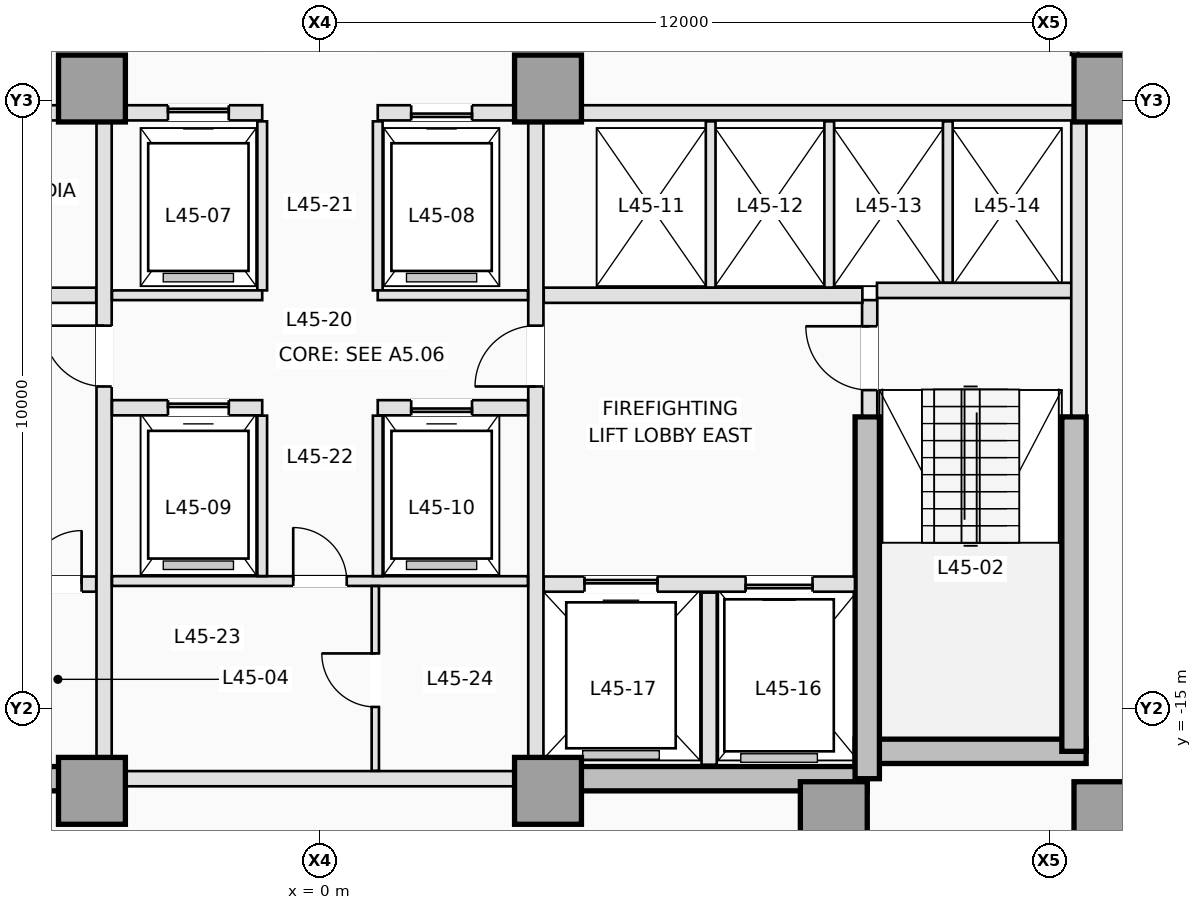
"""IFC4 building model, lengths in metres.
Left out: names, types, materials, properties, quantities, classifications, styles, units other than length and angle.
Written with IfcOpenShell. Run it as: python <this file> out.ifc"""

import sys

from ifc_helpers import new_model, si_unit, direction, frame, frame_2d, origin, origin_2d, place, context, subcontext, project, spatial, rectangle, extrude, element, fill, save


model = new_model("IFC4")
c1 = context("Model", 3, precision=1e-05, world=origin(), true_north=direction((0.0, 1.0)))
c2 = subcontext(c1, "Body", "Model", "MODEL_VIEW")
j1 = project(units=[si_unit("LENGTHUNIT", "METRE"), si_unit("PLANEANGLEUNIT", "RADIAN")], contexts=[c1])
p1 = place(None, origin())
s1 = spatial("IfcSite", under=j1, at=p1, CompositionType="ELEMENT")
p2 = place(p1, origin())
s2 = spatial("IfcBuilding", under=s1, at=p2, CompositionType="ELEMENT")
p3 = place(p2, frame((0.0, 0.0, 165.0)))
s3 = spatial("IfcBuildingStorey", under=s2, at=p3, CompositionType="ELEMENT", Elevation=165.0)
for number, where, z_axis, x_axis in (
    (1, (-9.0, -16.15, 0.0), (0.0, 0.0, 1.0), (1.0, 0.0, 0.0)),
    (2, (3.75, -16.15, 0.0), (0.0, 0.0, 1.0), (1.0, 0.0, 0.0)),
):
    element("IfcWall", number, at=place(p3, frame(where, z_axis=z_axis, x_axis=x_axis)), inside=s3, PredefinedType="SHEAR", context=c2, shape_type="SweptSolid", body=[
        extrude(rectangle(XDim=5.25, YDim=0.4, at=frame_2d((2.625, 0.0))), origin(), (0.0, 0.0, 1.0), 3.5),
    ])
p4 = place(p3, frame((8.8, -15.7, 0.0), z_axis=(0.0, 0.0, 1.0), x_axis=(1.0, 0.0, 0.0)))
e3 = element("IfcWall", 3, at=p4, inside=s3, PredefinedType="SHEAR", context=c2, shape_type="SweptSolid", body=[
    extrude(rectangle(XDim=3.8, YDim=0.4, at=frame_2d((1.9, 0.0))), origin(), (0.0, 0.0, 1.0), 3.5),
])
p5 = place(p3, frame((12.4, -15.7, 0.0), z_axis=(0.0, 0.0, 1.0), x_axis=(0.0, 1.0, 0.0)))
e4 = element("IfcWall", 4, at=p5, inside=s3, PredefinedType="SHEAR", context=c2, shape_type="SweptSolid", body=[
    extrude(rectangle(XDim=5.5, YDim=0.4, at=frame_2d((2.75, 0.0))), origin(), (0.0, 0.0, 1.0), 3.5),
])
p6 = place(p3, frame((9.0, -16.15, 0.0), z_axis=(0.0, 0.0, 1.0), x_axis=(0.0, 1.0, 0.0)))
e5 = element("IfcWall", 5, at=p6, inside=s3, PredefinedType="SHEAR", context=c2, shape_type="SweptSolid", body=[
    extrude(rectangle(XDim=5.95, YDim=0.4, at=frame_2d((2.975, 0.0))), origin(), (0.0, 0.0, 1.0), 3.5),
])
for number, where, z_axis, x_axis in (
    (6, (-3.75, -16.35, 0.0), (0.0, 0.0, 1.0), (1.0, 0.0, 0.0)),
    (7, (3.75, -16.35, 0.0), (0.0, 0.0, 1.0), (1.0, 0.0, 0.0)),
    (8, (8.45, -16.75, 0.0), (0.0, 0.0, 1.0), (1.0, 0.0, 0.0)),
    (9, (12.95, -16.75, 0.0), (0.0, 0.0, 1.0), (1.0, 0.0, 0.0)),
    (10, (-3.75, -4.8, 0.0), (0.0, 0.0, 1.0), (1.0, 0.0, 0.0)),
    (11, (3.75, -4.8, 0.0), (0.0, 0.0, 1.0), (1.0, 0.0, 0.0)),
    (12, (12.95, -4.8, 0.0), (0.0, 0.0, 1.0), (1.0, 0.0, 0.0)),
):
    element("IfcColumn", number, at=place(p3, frame(where, z_axis=z_axis, x_axis=x_axis)), inside=s3, PredefinedType="COLUMN", context=c2, shape_type="SweptSolid", body=[
        extrude(rectangle(XDim=1.1, YDim=1.1, at=origin_2d()), origin(), (0.0, 0.0, 1.0), 3.5),
    ])
p7 = place(p3, frame((9.04, -10.18, 0.0), z_axis=(0.0, 0.0, 1.0), x_axis=(0.0, 1.0, 0.0)))
e13 = element("IfcWall", 13, at=p7, inside=s3, PredefinedType="PARTITIONING", context=c2, shape_type="SweptSolid", body=[
    extrude(rectangle(XDim=1.9, YDim=0.25, at=frame_2d((0.95, 0.0))), origin(), (0.0, 0.0, 1.0), 3.25),
])
p8 = place(p7, frame((0.42, 0.0, 0.0)))
e14 = element("IfcOpeningElement", 14, at=p8, cuts=e13, PredefinedType="OPENING", context=c2, shape_type="SweptSolid", body=[
    extrude(rectangle(XDim=1.05, YDim=2.15, at=frame_2d((0.525, 1.075))), frame((0.0, 0.135, 0.0), z_axis=(0.0, -1.0, 0.0), x_axis=(1.0, 0.0, 0.0)), (0.0, 0.0, 1.0), 0.27),
])
p9 = place(p3, frame((9.16, -8.12, 0.0), z_axis=(0.0, 0.0, 1.0), x_axis=(1.0, 0.0, 0.0)))
e15 = element("IfcWall", 15, at=p9, inside=s3, PredefinedType="PARTITIONING", context=c2, shape_type="SweptSolid", body=[
    extrude(rectangle(XDim=3.22, YDim=0.25, at=frame_2d((1.61, 0.0))), origin(), (0.0, 0.0, 1.0), 3.25),
])
p10 = place(p3, frame((12.48, -10.18, 0.0), z_axis=(0.0, 0.0, 1.0), x_axis=(0.0, 1.0, 0.0)))
e16 = element("IfcWall", 16, at=p10, inside=s3, PredefinedType="PARTITIONING", context=c2, shape_type="SweptSolid", body=[
    extrude(rectangle(XDim=4.828, YDim=0.25, at=frame_2d((2.414, 0.0))), origin(), (0.0, 0.0, 1.0), 3.25),
])
p11 = place(p3, frame((-8.798, -12.95, 0.0), z_axis=(0.0, 0.0, 1.0), x_axis=(1.0, 0.0, 0.0)))
e17 = element("IfcWall", 17, at=p11, inside=s3, PredefinedType="PARTITIONING", context=c2, shape_type="SweptSolid", body=[
    extrude(rectangle(XDim=5.118, YDim=0.25, at=frame_2d((2.559, 0.0))), origin(), (0.0, 0.0, 1.0), 3.25),
])
p12 = place(p11, frame((0.698, 0.0, 0.0)))
e18 = element("IfcOpeningElement", 18, at=p12, cuts=e17, PredefinedType="OPENING", context=c2, shape_type="SweptSolid", body=[
    extrude(rectangle(XDim=1.1, YDim=2.15, at=frame_2d((0.55, 1.075))), frame((0.0, 0.135, 0.0), z_axis=(0.0, -1.0, 0.0), x_axis=(1.0, 0.0, 0.0)), (0.0, 0.0, 1.0), 0.27),
])
p13 = place(p11, frame((2.598, 0.0, 0.0)))
e19 = element("IfcOpeningElement", 19, at=p13, cuts=e17, PredefinedType="OPENING", context=c2, shape_type="SweptSolid", body=[
    extrude(rectangle(XDim=0.88, YDim=2.1, at=frame_2d((0.44, 1.05))), frame((0.0, 0.135, 0.0), z_axis=(0.0, -1.0, 0.0), x_axis=(1.0, 0.0, 0.0)), (0.0, 0.0, 1.0), 0.27),
])
p14 = place(p11, frame((3.998, 0.0, 0.0)))
e20 = element("IfcOpeningElement", 20, at=p14, cuts=e17, PredefinedType="OPENING", context=c2, shape_type="SweptSolid", body=[
    extrude(rectangle(XDim=0.88, YDim=2.1, at=frame_2d((0.44, 1.05))), frame((0.0, 0.135, 0.0), z_axis=(0.0, -1.0, 0.0), x_axis=(1.0, 0.0, 0.0)), (0.0, 0.0, 1.0), 0.27),
])
p15 = place(p3, frame((3.68, -12.95, 0.0), z_axis=(0.0, 0.0, 1.0), x_axis=(1.0, 0.0, 0.0)))
e21 = element("IfcWall", 21, at=p15, inside=s3, PredefinedType="PARTITIONING", context=c2, shape_type="SweptSolid", body=[
    extrude(rectangle(XDim=5.118, YDim=0.25, at=frame_2d((2.559, 0.0))), origin(), (0.0, 0.0, 1.0), 3.25),
])
p16 = place(p15, frame((3.32, 0.0, 0.0)))
e22 = element("IfcOpeningElement", 22, at=p16, cuts=e21, PredefinedType="OPENING", context=c2, shape_type="SweptSolid", body=[
    extrude(rectangle(XDim=1.1, YDim=2.15, at=frame_2d((0.55, 1.075))), frame((0.0, 0.135, 0.0), z_axis=(0.0, -1.0, 0.0), x_axis=(1.0, 0.0, 0.0)), (0.0, 0.0, 1.0), 0.27),
])
p17 = place(p15, frame((0.67, 0.0, 0.0)))
e23 = element("IfcOpeningElement", 23, at=p17, cuts=e21, PredefinedType="OPENING", context=c2, shape_type="SweptSolid", body=[
    extrude(rectangle(XDim=1.2, YDim=2.15, at=frame_2d((0.6, 1.075))), frame((0.0, 0.135, 0.0), z_axis=(0.0, -1.0, 0.0), x_axis=(1.0, 0.0, 0.0)), (0.0, 0.0, 1.0), 0.27),
])
p18 = place(p3, frame((6.4, -15.92, 0.0), z_axis=(0.0, 0.0, 1.0), x_axis=(0.0, 1.0, 0.0)))
e24 = element("IfcWall", 24, at=p18, inside=s3, PredefinedType="PARTITIONING", context=c2, shape_type="SweptSolid", body=[
    extrude(rectangle(XDim=2.83, YDim=0.25, at=frame_2d((1.415, 0.0))), origin(), (0.0, 0.0, 1.0), 3.25),
])
for number, where, z_axis, x_axis in (
    (25, (-8.92, -8.2, 0.0), (0.0, 0.0, 1.0), (1.0, 0.0, 0.0)),
    (26, (3.68, -8.2, 0.0), (0.0, 0.0, 1.0), (1.0, 0.0, 0.0)),
):
    element("IfcWall", number, at=place(p3, frame(where, z_axis=z_axis, x_axis=x_axis)), inside=s3, PredefinedType="PARTITIONING", context=c2, shape_type="SweptSolid", body=[
        extrude(rectangle(XDim=5.24, YDim=0.25, at=frame_2d((2.62, 0.0))), origin(), (0.0, 0.0, 1.0), 3.25),
    ])
p19 = place(p3, frame((-3.55, -15.798, 0.0), z_axis=(0.0, 0.0, 1.0), x_axis=(0.0, 1.0, 0.0)))
e27 = element("IfcWall", 27, at=p19, inside=s3, PredefinedType="PARTITIONING", context=c2, shape_type="SweptSolid", body=[
    extrude(rectangle(XDim=10.446, YDim=0.25, at=frame_2d((5.223, 0.0))), origin(), (0.0, 0.0, 1.0), 3.25),
])
p20 = place(p19, frame((6.098, 0.0, 0.0)))
e28 = element("IfcOpeningElement", 28, at=p20, cuts=e27, PredefinedType="OPENING", context=c2, shape_type="SweptSolid", body=[
    extrude(rectangle(XDim=1.0, YDim=2.15, at=frame_2d((0.5, 1.075))), frame((0.0, 0.135, 0.0), z_axis=(0.0, -1.0, 0.0), x_axis=(1.0, 0.0, 0.0)), (0.0, 0.0, 1.0), 0.27),
])
p21 = place(p3, frame((3.55, -15.798, 0.0), z_axis=(0.0, 0.0, 1.0), x_axis=(0.0, 1.0, 0.0)))
e29 = element("IfcWall", 29, at=p21, inside=s3, PredefinedType="PARTITIONING", context=c2, shape_type="SweptSolid", body=[
    extrude(rectangle(XDim=10.446, YDim=0.25, at=frame_2d((5.223, 0.0))), origin(), (0.0, 0.0, 1.0), 3.25),
])
p22 = place(p21, frame((6.098, 0.0, 0.0)))
e30 = element("IfcOpeningElement", 30, at=p22, cuts=e29, PredefinedType="OPENING", context=c2, shape_type="SweptSolid", body=[
    extrude(rectangle(XDim=1.0, YDim=2.15, at=frame_2d((0.5, 1.075))), frame((0.0, 0.135, 0.0), z_axis=(0.0, -1.0, 0.0), x_axis=(1.0, 0.0, 0.0)), (0.0, 0.0, 1.0), 0.27),
])
p23 = place(p3, frame((-12.398, -5.2, 0.0), z_axis=(0.0, 0.0, 1.0), x_axis=(1.0, 0.0, 0.0)))
e31 = element("IfcWall", 31, at=p23, inside=s3, PredefinedType="PARTITIONING", context=c2, shape_type="SweptSolid", body=[
    extrude(rectangle(XDim=8.096, YDim=0.25, at=frame_2d((4.048, 0.0))), origin(), (0.0, 0.0, 1.0), 3.25),
])
p24 = place(p23, frame((2.968, 0.0, 0.0)))
e32 = element("IfcOpeningElement", 32, at=p24, cuts=e31, PredefinedType="OPENING", context=c2, shape_type="SweptSolid", body=[
    extrude(rectangle(XDim=0.92, YDim=2.12, at=frame_2d((0.46, 1.06))), frame((0.0, 0.135, 0.0), z_axis=(0.0, -1.0, 0.0), x_axis=(1.0, 0.0, 0.0)), (0.0, 0.0, 1.0), 0.27),
])
p25 = place(p23, frame((6.068, 0.0, 0.0)))
e33 = element("IfcOpeningElement", 33, at=p25, cuts=e31, PredefinedType="OPENING", context=c2, shape_type="SweptSolid", body=[
    extrude(rectangle(XDim=0.92, YDim=2.12, at=frame_2d((0.46, 1.06))), frame((0.0, 0.135, 0.0), z_axis=(0.0, -1.0, 0.0), x_axis=(1.0, 0.0, 0.0)), (0.0, 0.0, 1.0), 0.27),
])
p26 = place(p3, frame((4.302, -5.2, 0.0), z_axis=(0.0, 0.0, 1.0), x_axis=(1.0, 0.0, 0.0)))
e34 = element("IfcWall", 34, at=p26, inside=s3, PredefinedType="PARTITIONING", context=c2, shape_type="SweptSolid", body=[
    extrude(rectangle(XDim=8.096, YDim=0.25, at=frame_2d((4.048, 0.0))), origin(), (0.0, 0.0, 1.0), 3.25),
])
p27 = place(p3, frame((-3.198, -5.2, 0.0), z_axis=(0.0, 0.0, 1.0), x_axis=(1.0, 0.0, 0.0)))
e35 = element("IfcWall", 35, at=p27, inside=s3, PredefinedType="PARTITIONING", context=c2, shape_type="SweptSolid", body=[
    extrude(rectangle(XDim=2.248, YDim=0.25, at=frame_2d((1.124, 0.0))), origin(), (0.0, 0.0, 1.0), 3.25),
])
p28 = place(p27, frame((0.698, 0.0, 0.0)))
e36 = element("IfcOpeningElement", 36, at=p28, cuts=e35, PredefinedType="OPENING", context=c2, shape_type="SweptSolid", body=[
    extrude(rectangle(XDim=1.0, YDim=2.15, at=frame_2d((0.5, 1.075))), frame((0.0, 0.135, 0.0), z_axis=(0.0, -1.0, 0.0), x_axis=(1.0, 0.0, 0.0)), (0.0, 0.0, 1.0), 0.27),
])
p29 = place(p3, frame((0.95, -5.2, 0.0), z_axis=(0.0, 0.0, 1.0), x_axis=(1.0, 0.0, 0.0)))
e37 = element("IfcWall", 37, at=p29, inside=s3, PredefinedType="PARTITIONING", context=c2, shape_type="SweptSolid", body=[
    extrude(rectangle(XDim=2.248, YDim=0.25, at=frame_2d((1.124, 0.0))), origin(), (0.0, 0.0, 1.0), 3.25),
])
p30 = place(p29, frame((0.55, 0.0, 0.0)))
e38 = element("IfcOpeningElement", 38, at=p30, cuts=e37, PredefinedType="OPENING", context=c2, shape_type="SweptSolid", body=[
    extrude(rectangle(XDim=1.0, YDim=2.15, at=frame_2d((0.5, 1.075))), frame((0.0, 0.135, 0.0), z_axis=(0.0, -1.0, 0.0), x_axis=(1.0, 0.0, 0.0)), (0.0, 0.0, 1.0), 0.27),
])
for number, where, z_axis, x_axis in (
    (39, (6.425, -8.073, 0.0), (0.0, 0.0, 1.0), (0.0, 1.0, 0.0)),
    (40, (8.375, -8.073, 0.0), (0.0, 0.0, 1.0), (0.0, 1.0, 0.0)),
):
    element("IfcWall", number, at=place(p3, frame(where, z_axis=z_axis, x_axis=x_axis)), inside=s3, PredefinedType="PARTITIONING", context=c2, shape_type="SweptSolid", body=[
        extrude(rectangle(XDim=2.733, YDim=0.16, at=frame_2d((1.366, 0.0))), origin(), (0.0, 0.0, 1.0), 3.25),
    ])
p31 = place(p3, frame((10.325, -7.993, 0.0), z_axis=(0.0, 0.0, 1.0), x_axis=(0.0, 1.0, 0.0)))
e41 = element("IfcWall", 41, at=p31, inside=s3, PredefinedType="PARTITIONING", context=c2, shape_type="SweptSolid", body=[
    extrude(rectangle(XDim=2.653, YDim=0.16, at=frame_2d((1.326, 0.0))), origin(), (0.0, 0.0, 1.0), 3.25),
])
p32 = place(p3, frame((-3.198, -16.15, 0.0), z_axis=(0.0, 0.0, 1.0), x_axis=(1.0, 0.0, 0.0)))
e42 = element("IfcWall", 42, at=p32, inside=s3, PredefinedType="PARTITIONING", context=c2, shape_type="SweptSolid", body=[
    extrude(rectangle(XDim=6.396, YDim=0.25, at=frame_2d((3.198, 0.0))), origin(), (0.0, 0.0, 1.0), 2.45),
])
for number, where, z_axis, x_axis in (
    (43, (-0.95, -8.12, 0.0), (0.0, 0.0, 1.0), (0.0, 1.0, 0.0)),
    (44, (0.95, -8.12, 0.0), (0.0, 0.0, 1.0), (0.0, 1.0, 0.0)),
):
    element("IfcWall", number, at=place(p3, frame(where, z_axis=z_axis, x_axis=x_axis)), inside=s3, PredefinedType="PARTITIONING", context=c2, shape_type="SweptSolid", body=[
        extrude(rectangle(XDim=2.78, YDim=0.16, at=frame_2d((1.39, 0.0))), origin(), (0.0, 0.0, 1.0), 3.25),
    ])
for number, where, z_axis, x_axis in (
    (45, (-3.42, -8.2, 0.0), (0.0, 0.0, 1.0), (1.0, 0.0, 0.0)),
    (46, (0.95, -8.2, 0.0), (0.0, 0.0, 1.0), (1.0, 0.0, 0.0)),
):
    element("IfcWall", number, at=place(p3, frame(where, z_axis=z_axis, x_axis=x_axis)), inside=s3, PredefinedType="PARTITIONING", context=c2, shape_type="SweptSolid", body=[
        extrude(rectangle(XDim=2.47, YDim=0.16, at=frame_2d((1.235, 0.0))), origin(), (0.0, 0.0, 1.0), 3.25),
    ])
p33 = place(p3, frame((-3.42, -10.05, 0.0), z_axis=(0.0, 0.0, 1.0), x_axis=(1.0, 0.0, 0.0)))
e47 = element("IfcWall", 47, at=p33, inside=s3, PredefinedType="PARTITIONING", context=c2, shape_type="SweptSolid", body=[
    extrude(rectangle(XDim=2.47, YDim=0.25, at=frame_2d((1.235, 0.0))), origin(), (0.0, 0.0, 1.0), 3.25),
])
p34 = place(p33, frame((0.92, 0.0, 0.0)))
e48 = element("IfcOpeningElement", 48, at=p34, cuts=e47, PredefinedType="OPENING", context=c2, shape_type="SweptSolid", body=[
    extrude(rectangle(XDim=1.0, YDim=2.15, at=frame_2d((0.5, 1.075))), frame((0.0, 0.135, 0.0), z_axis=(0.0, -1.0, 0.0), x_axis=(1.0, 0.0, 0.0)), (0.0, 0.0, 1.0), 0.27),
])
p35 = place(p3, frame((0.95, -10.05, 0.0), z_axis=(0.0, 0.0, 1.0), x_axis=(1.0, 0.0, 0.0)))
e49 = element("IfcWall", 49, at=p35, inside=s3, PredefinedType="PARTITIONING", context=c2, shape_type="SweptSolid", body=[
    extrude(rectangle(XDim=2.47, YDim=0.25, at=frame_2d((1.235, 0.0))), origin(), (0.0, 0.0, 1.0), 3.25),
])
p36 = place(p35, frame((0.55, 0.0, 0.0)))
e50 = element("IfcOpeningElement", 50, at=p36, cuts=e49, PredefinedType="OPENING", context=c2, shape_type="SweptSolid", body=[
    extrude(rectangle(XDim=1.0, YDim=2.15, at=frame_2d((0.5, 1.075))), frame((0.0, 0.135, 0.0), z_axis=(0.0, -1.0, 0.0), x_axis=(1.0, 0.0, 0.0)), (0.0, 0.0, 1.0), 0.27),
])
p37 = place(p3, frame((-3.42, -12.9, 0.0), z_axis=(0.0, 0.0, 1.0), x_axis=(1.0, 0.0, 0.0)))
e51 = element("IfcWall", 51, at=p37, inside=s3, PredefinedType="PARTITIONING", context=c2, shape_type="SweptSolid", body=[
    extrude(rectangle(XDim=6.84, YDim=0.16, at=frame_2d((3.42, 0.0))), origin(), (0.0, 0.0, 1.0), 3.25),
])
p38 = place(p37, frame((2.98, 0.0, 0.0)))
e52 = element("IfcOpeningElement", 52, at=p38, cuts=e51, PredefinedType="OPENING", context=c2, shape_type="SweptSolid", body=[
    extrude(rectangle(XDim=0.88, YDim=2.12, at=frame_2d((0.44, 1.06))), frame((0.0, 0.09, 0.0), z_axis=(0.0, -1.0, 0.0), x_axis=(1.0, 0.0, 0.0)), (0.0, 0.0, 1.0), 0.18),
])
for number, where, z_axis, x_axis in (
    (53, (-0.95, -12.818, 0.0), (0.0, 0.0, 1.0), (0.0, 1.0, 0.0)),
    (54, (0.95, -12.818, 0.0), (0.0, 0.0, 1.0), (0.0, 1.0, 0.0)),
):
    element("IfcWall", number, at=place(p3, frame(where, z_axis=z_axis, x_axis=x_axis)), inside=s3, PredefinedType="PARTITIONING", context=c2, shape_type="SweptSolid", body=[
        extrude(rectangle(XDim=2.638, YDim=0.16, at=frame_2d((1.319, 0.0))), origin(), (0.0, 0.0, 1.0), 3.25),
    ])
p39 = place(p3, frame((0.91, -16.02, 0.0), z_axis=(0.0, 0.0, 1.0), x_axis=(0.0, 1.0, 0.0)))
e55 = element("IfcWall", 55, at=p39, inside=s3, PredefinedType="PARTITIONING", context=c2, shape_type="SweptSolid", body=[
    extrude(rectangle(XDim=3.038, YDim=0.12, at=frame_2d((1.519, 0.0))), origin(), (0.0, 0.0, 1.0), 3.25),
])
p40 = place(p39, frame((1.05, 0.0, 0.0)))
e56 = element("IfcOpeningElement", 56, at=p40, cuts=e55, PredefinedType="OPENING", context=c2, shape_type="SweptSolid", body=[
    extrude(rectangle(XDim=0.88, YDim=2.12, at=frame_2d((0.44, 1.06))), frame((0.0, 0.07, 0.0), z_axis=(0.0, -1.0, 0.0), x_axis=(1.0, 0.0, 0.0)), (0.0, 0.0, 1.0), 0.14),
])
p41 = place(p3, frame((12.41, -2.462, 0.0), z_axis=(0.0, 0.0, 1.0), x_axis=(0.0, -1.0, 0.0)))
e57 = element("IfcWall", 57, at=p41, inside=s3, PredefinedType="PARTITIONING", context=c2, shape_type="SweptSolid", body=[
    extrude(rectangle(XDim=1.786, YDim=0.12, at=frame_2d((0.893, 0.0))), origin(), (0.0, 0.0, 1.0), 3.25),
])
p42 = place(p28, origin())
e58 = element("IfcDoor", 58, at=p42, inside=s3, OperationType="SLIDING_TO_LEFT", PredefinedType="DOOR", context=c2, shape_type="SweptSolid", body=[
    extrude(rectangle(XDim=1.0, YDim=2.15, at=frame_2d((0.5, 1.075))), frame((0.0, 0.025, 0.0), z_axis=(0.0, -1.0, 0.0), x_axis=(1.0, 0.0, 0.0)), (0.0, 0.0, 1.0), 0.05),
])
fill(e36, e58)
p43 = place(p30, origin())
e59 = element("IfcDoor", 59, at=p43, inside=s3, OperationType="SLIDING_TO_RIGHT", PredefinedType="DOOR", context=c2, shape_type="SweptSolid", body=[
    extrude(rectangle(XDim=1.0, YDim=2.15, at=frame_2d((0.5, 1.075))), frame((0.0, 0.025, 0.0), z_axis=(0.0, -1.0, 0.0), x_axis=(1.0, 0.0, 0.0)), (0.0, 0.0, 1.0), 0.05),
])
fill(e38, e59)
p44 = place(p16, origin())
e60 = element("IfcDoor", 60, at=p44, inside=s3, OperationType="SLIDING_TO_RIGHT", PredefinedType="DOOR", context=c2, shape_type="SweptSolid", body=[
    extrude(rectangle(XDim=1.1, YDim=2.15, at=frame_2d((0.55, 1.075))), frame((0.0, 0.025, 0.0), z_axis=(0.0, -1.0, 0.0), x_axis=(1.0, 0.0, 0.0)), (0.0, 0.0, 1.0), 0.05),
])
fill(e22, e60)
p45 = place(p17, origin())
e61 = element("IfcDoor", 61, at=p45, inside=s3, OperationType="SLIDING_TO_LEFT", PredefinedType="DOOR", context=c2, shape_type="SweptSolid", body=[
    extrude(rectangle(XDim=1.2, YDim=2.15, at=frame_2d((0.6, 1.075))), frame((0.0, 0.025, 0.0), z_axis=(0.0, -1.0, 0.0), x_axis=(1.0, 0.0, 0.0)), (0.0, 0.0, 1.0), 0.05),
])
fill(e23, e61)
p46 = place(p34, origin())
e62 = element("IfcDoor", 62, at=p46, inside=s3, OperationType="SLIDING_TO_LEFT", PredefinedType="DOOR", context=c2, shape_type="SweptSolid", body=[
    extrude(rectangle(XDim=1.0, YDim=2.15, at=frame_2d((0.5, 1.075))), frame((0.0, 0.025, 0.0), z_axis=(0.0, -1.0, 0.0), x_axis=(1.0, 0.0, 0.0)), (0.0, 0.0, 1.0), 0.05),
])
fill(e48, e62)
p47 = place(p36, origin())
e63 = element("IfcDoor", 63, at=p47, inside=s3, OperationType="SLIDING_TO_RIGHT", PredefinedType="DOOR", context=c2, shape_type="SweptSolid", body=[
    extrude(rectangle(XDim=1.0, YDim=2.15, at=frame_2d((0.5, 1.075))), frame((0.0, 0.025, 0.0), z_axis=(0.0, -1.0, 0.0), x_axis=(1.0, 0.0, 0.0)), (0.0, 0.0, 1.0), 0.05),
])
fill(e50, e63)
p48 = place(p8, origin())
e64 = element("IfcDoor", 64, at=p48, inside=s3, OperationType="SINGLE_SWING_RIGHT", PredefinedType="DOOR", context=c2, shape_type="SweptSolid", body=[
    extrude(rectangle(XDim=1.05, YDim=2.15, at=frame_2d((0.525, 1.075))), frame((0.0, 0.025, 0.0), z_axis=(0.0, -1.0, 0.0), x_axis=(1.0, 0.0, 0.0)), (0.0, 0.0, 1.0), 0.05),
])
fill(e14, e64)
p49 = place(p14, origin())
e65 = element("IfcDoor", 65, at=p49, inside=s3, OperationType="SINGLE_SWING_RIGHT", PredefinedType="TRAPDOOR", context=c2, shape_type="SweptSolid", body=[
    extrude(rectangle(XDim=0.88, YDim=2.1, at=frame_2d((0.44, 1.05))), frame((0.0, 0.025, 0.0), z_axis=(0.0, -1.0, 0.0), x_axis=(1.0, 0.0, 0.0)), (0.0, 0.0, 1.0), 0.05),
])
fill(e20, e65)
p50 = place(p20, origin())
e66 = element("IfcDoor", 66, at=p50, inside=s3, OperationType="SINGLE_SWING_RIGHT", PredefinedType="DOOR", context=c2, shape_type="SweptSolid", body=[
    extrude(rectangle(XDim=1.0, YDim=2.15, at=frame_2d((0.5, 1.075))), frame((0.0, 0.025, 0.0), z_axis=(0.0, -1.0, 0.0), x_axis=(1.0, 0.0, 0.0)), (0.0, 0.0, 1.0), 0.05),
])
fill(e28, e66)
p51 = place(p22, origin())
e67 = element("IfcDoor", 67, at=p51, inside=s3, OperationType="SINGLE_SWING_LEFT", PredefinedType="DOOR", context=c2, shape_type="SweptSolid", body=[
    extrude(rectangle(XDim=1.0, YDim=2.15, at=frame_2d((0.5, 1.075))), frame((0.0, 0.025, 0.0), z_axis=(0.0, -1.0, 0.0), x_axis=(1.0, 0.0, 0.0)), (0.0, 0.0, 1.0), 0.05),
])
fill(e30, e67)
p52 = place(p38, origin())
e68 = element("IfcDoor", 68, at=p52, inside=s3, OperationType="SINGLE_SWING_LEFT", PredefinedType="DOOR", context=c2, shape_type="SweptSolid", body=[
    extrude(rectangle(XDim=0.88, YDim=2.12, at=frame_2d((0.44, 1.06))), frame((0.0, 0.025, 0.0), z_axis=(0.0, -1.0, 0.0), x_axis=(1.0, 0.0, 0.0)), (0.0, 0.0, 1.0), 0.05),
])
fill(e52, e68)
p53 = place(p40, origin())
e69 = element("IfcDoor", 69, at=p53, inside=s3, OperationType="SINGLE_SWING_RIGHT", PredefinedType="DOOR", context=c2, shape_type="SweptSolid", body=[
    extrude(rectangle(XDim=0.88, YDim=2.12, at=frame_2d((0.44, 1.06))), frame((0.0, 0.025, 0.0), z_axis=(0.0, -1.0, 0.0), x_axis=(1.0, 0.0, 0.0)), (0.0, 0.0, 1.0), 0.05),
])
fill(e56, e69)
save(model, sys.argv[1])
